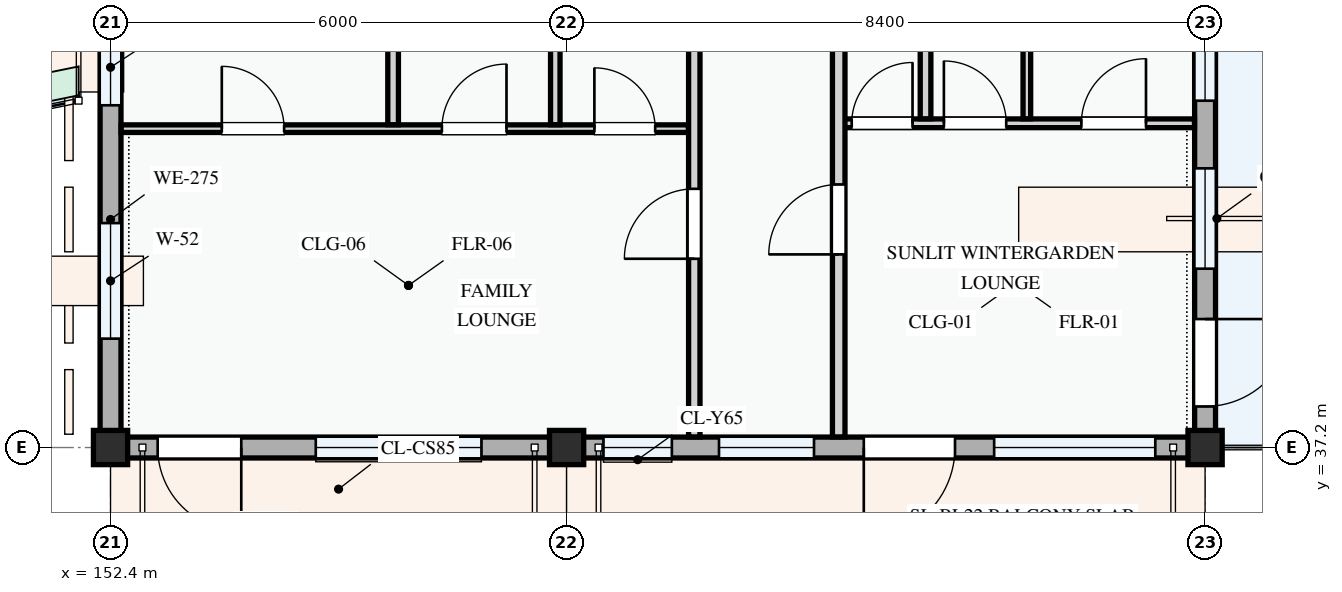
"""IFC4 building model, lengths in metres.
Left out: names, types, materials, properties, quantities, classifications, styles, units other than length and angle.
Written with IfcOpenShell. Run it as: python <this file> out.ifc"""

import sys

from ifc_helpers import new_model, si_unit, direction, frame, frame_2d, origin, origin_2d, place, context, subcontext, project, spatial, rectangle, extrude, element, fill, save


model = new_model("IFC4")
c1 = context("Model", 3, precision=1e-05, world=origin(), true_north=direction((0.0, 1.0)))
c2 = subcontext(c1, "Body", "Model", "MODEL_VIEW")
j1 = project(units=[si_unit("LENGTHUNIT", "METRE"), si_unit("PLANEANGLEUNIT", "RADIAN")], contexts=[c1])
p1 = place(None, origin())
s1 = spatial("IfcSite", under=j1, at=p1, CompositionType="ELEMENT")
p2 = place(p1, origin())
s2 = spatial("IfcBuilding", under=s1, at=p2, CompositionType="ELEMENT")
p3 = place(p2, frame((0.0, 0.0, 21.3)))
s3 = spatial("IfcBuildingStorey", under=s2, at=p3, CompositionType="ELEMENT", Elevation=21.3)
for number, where, z_axis, x_axis in (
    (1, (152.4, 37.2, 0.0), (0.0, 0.0, 1.0), (1.0, 0.0, 0.0)),
    (2, (158.4, 37.2, 0.0), (0.0, 0.0, 1.0), (1.0, 0.0, 0.0)),
    (3, (166.8, 37.2, 0.0), (0.0, 0.0, 1.0), (1.0, 0.0, 0.0)),
):
    element("IfcColumn", number, at=place(p3, frame(where, z_axis=z_axis, x_axis=x_axis)), inside=s3, PredefinedType="COLUMN", context=c2, shape_type="SweptSolid", body=[
        extrude(rectangle(XDim=0.45, YDim=0.45, at=origin_2d()), origin(), (0.0, 0.0, 1.0), 3.3),
    ])
p4 = place(p3, frame((152.4, 43.2, 0.0), z_axis=(0.0, 0.0, 1.0), x_axis=(0.0, -1.0, 0.0)))
e4 = element("IfcWall", 4, at=p4, inside=s3, PredefinedType="STANDARD", context=c2, shape_type="SweptSolid", body=[
    extrude(rectangle(XDim=6.0, YDim=0.275, at=frame_2d((3.0, 0.0))), origin(), (0.0, 0.0, 1.0), 2.575),
])
p5 = place(p4, frame((0.498, 0.0, 0.78)))
e5 = element("IfcOpeningElement", 5, at=p5, cuts=e4, PredefinedType="OPENING", context=c2, shape_type="SweptSolid", body=[
    extrude(rectangle(XDim=1.0, YDim=1.25, at=frame_2d((0.5, 0.625))), frame((0.0, 0.147, 0.0), z_axis=(0.0, -1.0, 0.0), x_axis=(1.0, 0.0, 0.0)), (0.0, 0.0, 1.0), 0.295),
])
p6 = place(p4, frame((3.048, 0.0, 0.78)))
e6 = element("IfcOpeningElement", 6, at=p6, cuts=e4, PredefinedType="OPENING", context=c2, shape_type="SweptSolid", body=[
    extrude(rectangle(XDim=1.52, YDim=1.42, at=frame_2d((0.76, 0.71))), frame((0.0, 0.147, 0.0), z_axis=(0.0, -1.0, 0.0), x_axis=(1.0, 0.0, 0.0)), (0.0, 0.0, 1.0), 0.295),
])
p7 = place(p3, frame((152.4, 37.2, 0.0), z_axis=(0.0, 0.0, 1.0), x_axis=(1.0, 0.0, 0.0)))
e7 = element("IfcWall", 7, at=p7, inside=s3, PredefinedType="STANDARD", context=c2, shape_type="SweptSolid", body=[
    extrude(rectangle(XDim=6.0, YDim=0.275, at=frame_2d((3.0, 0.0))), origin(), (0.0, 0.0, 1.0), 2.475),
])
p8 = place(p7, frame((0.62, 0.0, 0.0)))
e8 = element("IfcOpeningElement", 8, at=p8, cuts=e7, PredefinedType="OPENING", context=c2, shape_type="SweptSolid", body=[
    extrude(rectangle(XDim=1.1, YDim=2.15, at=frame_2d((0.55, 1.075))), frame((0.0, 0.147, 0.0), z_axis=(0.0, -1.0, 0.0), x_axis=(1.0, 0.0, 0.0)), (0.0, 0.0, 1.0), 0.295),
])
p9 = place(p7, frame((2.7, 0.0, 0.78)))
e9 = element("IfcOpeningElement", 9, at=p9, cuts=e7, PredefinedType="OPENING", context=c2, shape_type="SweptSolid", body=[
    extrude(rectangle(XDim=2.18, YDim=1.48, at=frame_2d((1.09, 0.74))), frame((0.0, 0.147, 0.0), z_axis=(0.0, -1.0, 0.0), x_axis=(1.0, 0.0, 0.0)), (0.0, 0.0, 1.0), 0.295),
])
p10 = place(p3, frame((158.4, 37.2, 0.0), z_axis=(0.0, 0.0, 1.0), x_axis=(1.0, 0.0, 0.0)))
e10 = element("IfcWall", 10, at=p10, inside=s3, PredefinedType="STANDARD", context=c2, shape_type="SweptSolid", body=[
    extrude(rectangle(XDim=8.4, YDim=0.275, at=frame_2d((4.2, 0.0))), origin(), (0.0, 0.0, 1.0), 2.375),
])
p11 = place(p10, frame((3.91, 0.0, 0.0)))
e11 = element("IfcOpeningElement", 11, at=p11, cuts=e10, PredefinedType="OPENING", context=c2, shape_type="SweptSolid", body=[
    extrude(rectangle(XDim=1.2, YDim=2.15, at=frame_2d((0.6, 1.075))), frame((0.0, 0.147, 0.0), z_axis=(0.0, -1.0, 0.0), x_axis=(1.0, 0.0, 0.0)), (0.0, 0.0, 1.0), 0.295),
])
p12 = place(p10, frame((0.485, 0.0, 0.78)))
e12 = element("IfcOpeningElement", 12, at=p12, cuts=e10, PredefinedType="OPENING", context=c2, shape_type="SweptSolid", body=[
    extrude(rectangle(XDim=0.9, YDim=1.2, at=frame_2d((0.45, 0.6))), frame((0.0, 0.147, 0.0), z_axis=(0.0, -1.0, 0.0), x_axis=(1.0, 0.0, 0.0)), (0.0, 0.0, 1.0), 0.295),
])
p13 = place(p10, frame((2.005, 0.0, 0.78)))
e13 = element("IfcOpeningElement", 13, at=p13, cuts=e10, PredefinedType="OPENING", context=c2, shape_type="SweptSolid", body=[
    extrude(rectangle(XDim=1.25, YDim=1.3, at=frame_2d((0.625, 0.65))), frame((0.0, 0.147, 0.0), z_axis=(0.0, -1.0, 0.0), x_axis=(1.0, 0.0, 0.0)), (0.0, 0.0, 1.0), 0.295),
])
p14 = place(p10, frame((5.625, 0.0, 0.78)))
e14 = element("IfcOpeningElement", 14, at=p14, cuts=e10, PredefinedType="OPENING", context=c2, shape_type="SweptSolid", body=[
    extrude(rectangle(XDim=2.12, YDim=1.44, at=frame_2d((1.06, 0.72))), frame((0.0, 0.147, 0.0), z_axis=(0.0, -1.0, 0.0), x_axis=(1.0, 0.0, 0.0)), (0.0, 0.0, 1.0), 0.295),
])
p15 = place(p3, frame((166.8, 37.2, 0.0), z_axis=(0.0, 0.0, 1.0), x_axis=(0.0, 1.0, 0.0)))
e15 = element("IfcWall", 15, at=p15, inside=s3, PredefinedType="STANDARD", context=c2, shape_type="SweptSolid", body=[
    extrude(rectangle(XDim=6.0, YDim=0.275, at=frame_2d((3.0, 0.0))), origin(), (0.0, 0.0, 1.0), 2.445),
])
p16 = place(p15, frame((0.54, 0.0, 0.0)))
e16 = element("IfcOpeningElement", 16, at=p16, cuts=e15, PredefinedType="OPENING", context=c2, shape_type="SweptSolid", body=[
    extrude(rectangle(XDim=1.15, YDim=2.15, at=frame_2d((0.575, 1.075))), frame((0.0, 0.147, 0.0), z_axis=(0.0, -1.0, 0.0), x_axis=(1.0, 0.0, 0.0)), (0.0, 0.0, 1.0), 0.295),
])
p17 = place(p15, frame((2.353, 0.0, 0.78)))
e17 = element("IfcOpeningElement", 17, at=p17, cuts=e15, PredefinedType="OPENING", context=c2, shape_type="SweptSolid", body=[
    extrude(rectangle(XDim=1.32, YDim=1.35, at=frame_2d((0.66, 0.675))), frame((0.0, 0.147, 0.0), z_axis=(0.0, -1.0, 0.0), x_axis=(1.0, 0.0, 0.0)), (0.0, 0.0, 1.0), 0.295),
])
p18 = place(p15, frame((4.563, 0.0, 0.78)))
e18 = element("IfcOpeningElement", 18, at=p18, cuts=e15, PredefinedType="OPENING", context=c2, shape_type="SweptSolid", body=[
    extrude(rectangle(XDim=0.95, YDim=1.15, at=frame_2d((0.475, 0.575))), frame((0.0, 0.147, 0.0), z_axis=(0.0, -1.0, 0.0), x_axis=(1.0, 0.0, 0.0)), (0.0, 0.0, 1.0), 0.295),
])
p19 = place(p3, frame((152.54, 41.395, 0.0), z_axis=(0.0, 0.0, 1.0), x_axis=(1.0, 0.0, 0.0)))
e19 = element("IfcWall", 19, at=p19, inside=s3, PredefinedType="PARTITIONING", context=c2, shape_type="SweptSolid", body=[
    extrude(rectangle(XDim=7.463, YDim=0.1, at=frame_2d((3.732, 0.0))), origin(), (0.0, 0.0, 1.0), 3.0),
])
p20 = place(p19, frame((1.324, 0.0, 0.0)))
e20 = element("IfcOpeningElement", 20, at=p20, cuts=e19, PredefinedType="OPENING", context=c2, shape_type="SweptSolid", body=[
    extrude(rectangle(XDim=0.82, YDim=2.08, at=frame_2d((0.41, 1.04))), frame((0.0, 0.06, 0.0), z_axis=(0.0, -1.0, 0.0), x_axis=(1.0, 0.0, 0.0)), (0.0, 0.0, 1.0), 0.12),
])
p21 = place(p19, frame((4.22, 0.0, 0.0)))
e21 = element("IfcOpeningElement", 21, at=p21, cuts=e19, PredefinedType="OPENING", context=c2, shape_type="SweptSolid", body=[
    extrude(rectangle(XDim=0.85, YDim=2.1, at=frame_2d((0.425, 1.05))), frame((0.0, 0.06, 0.0), z_axis=(0.0, -1.0, 0.0), x_axis=(1.0, 0.0, 0.0)), (0.0, 0.0, 1.0), 0.12),
])
p22 = place(p19, frame((6.226, 0.0, 0.0)))
e22 = element("IfcOpeningElement", 22, at=p22, cuts=e19, PredefinedType="OPENING", context=c2, shape_type="SweptSolid", body=[
    extrude(rectangle(XDim=0.8, YDim=2.1, at=frame_2d((0.4, 1.05))), frame((0.0, 0.06, 0.0), z_axis=(0.0, -1.0, 0.0), x_axis=(1.0, 0.0, 0.0)), (0.0, 0.0, 1.0), 0.12),
])
p23 = place(p3, frame((156.118, 41.447, 0.0), z_axis=(0.0, 0.0, 1.0), x_axis=(0.0, 1.0, 0.0)))
e23 = element("IfcWall", 23, at=p23, inside=s3, PredefinedType="PARTITIONING", context=c2, shape_type="SweptSolid", body=[
    extrude(rectangle(XDim=7.181, YDim=0.14, at=frame_2d((3.59, 0.0))), origin(), (0.0, 0.0, 1.0), 3.0),
])
p24 = place(p3, frame((158.251, 41.447, 0.0), z_axis=(0.0, 0.0, 1.0), x_axis=(0.0, 1.0, 0.0)))
e24 = element("IfcWall", 24, at=p24, inside=s3, PredefinedType="PARTITIONING", context=c2, shape_type="SweptSolid", body=[
    extrude(rectangle(XDim=7.181, YDim=0.125, at=frame_2d((3.59, 0.0))), origin(), (0.0, 0.0, 1.0), 2.425),
])
p25 = place(p3, frame((161.98, 41.466, 0.0), z_axis=(0.0, 0.0, 1.0), x_axis=(1.0, 0.0, 0.0)))
e25 = element("IfcWall", 25, at=p25, inside=s3, PredefinedType="PARTITIONING", context=c2, shape_type="SweptSolid", body=[
    extrude(rectangle(XDim=4.68, YDim=0.115, at=frame_2d((2.34, 0.0))), origin(), (0.0, 0.0, 1.0), 3.0),
])
p26 = place(p25, frame((0.171, 0.0, 0.0)))
e26 = element("IfcOpeningElement", 26, at=p26, cuts=e25, PredefinedType="OPENING", context=c2, shape_type="SweptSolid", body=[
    extrude(rectangle(XDim=0.8, YDim=2.1, at=frame_2d((0.4, 1.05))), frame((0.0, 0.067, 0.0), z_axis=(0.0, -1.0, 0.0), x_axis=(1.0, 0.0, 0.0)), (0.0, 0.0, 1.0), 0.135),
])
p27 = place(p25, frame((1.384, 0.0, 0.0)))
e27 = element("IfcOpeningElement", 27, at=p27, cuts=e25, PredefinedType="OPENING", context=c2, shape_type="SweptSolid", body=[
    extrude(rectangle(XDim=0.82, YDim=2.08, at=frame_2d((0.41, 1.04))), frame((0.0, 0.067, 0.0), z_axis=(0.0, -1.0, 0.0), x_axis=(1.0, 0.0, 0.0)), (0.0, 0.0, 1.0), 0.135),
])
p28 = place(p25, frame((3.193, 0.0, 0.0)))
e28 = element("IfcOpeningElement", 28, at=p28, cuts=e25, PredefinedType="OPENING", context=c2, shape_type="SweptSolid", body=[
    extrude(rectangle(XDim=0.85, YDim=2.1, at=frame_2d((0.425, 1.05))), frame((0.0, 0.067, 0.0), z_axis=(0.0, -1.0, 0.0), x_axis=(1.0, 0.0, 0.0)), (0.0, 0.0, 1.0), 0.135),
])
p29 = place(p3, frame((164.455, 41.525, 0.0), z_axis=(0.0, 0.0, 1.0), x_axis=(0.0, 1.0, 0.0)))
e29 = element("IfcWall", 29, at=p29, inside=s3, PredefinedType="PARTITIONING", context=c2, shape_type="SweptSolid", body=[
    extrude(rectangle(XDim=7.093, YDim=0.1, at=frame_2d((3.546, 0.0))), origin(), (0.0, 0.0, 1.0), 3.0),
])
p30 = place(p3, frame((163.122, 41.525, 0.0), z_axis=(0.0, 0.0, 1.0), x_axis=(0.0, 1.0, 0.0)))
e30 = element("IfcWall", 30, at=p30, inside=s3, PredefinedType="PARTITIONING", context=c2, shape_type="SweptSolid", body=[
    extrude(rectangle(XDim=7.093, YDim=0.14, at=frame_2d((3.546, 0.0))), origin(), (0.0, 0.0, 1.0), 3.0),
])
p31 = place(p3, frame((160.08, 37.34, 0.0), z_axis=(0.0, 0.0, 1.0), x_axis=(0.0, 1.0, 0.0)))
e31 = element("IfcWall", 31, at=p31, inside=s3, PredefinedType="PARTITIONING", context=c2, shape_type="SweptSolid", body=[
    extrude(rectangle(XDim=20.4, YDim=0.15, at=frame_2d((10.2, 0.0))), origin(), (0.0, 0.0, 1.0), 3.0),
])
p32 = place(p31, frame((2.344, 0.0, 0.0)))
e32 = element("IfcOpeningElement", 32, at=p32, cuts=e31, PredefinedType="OPENING", context=c2, shape_type="SweptSolid", body=[
    extrude(rectangle(XDim=0.92, YDim=2.1, at=frame_2d((0.46, 1.05))), frame((0.0, 0.085, 0.0), z_axis=(0.0, -1.0, 0.0), x_axis=(1.0, 0.0, 0.0)), (0.0, 0.0, 1.0), 0.17),
])
p33 = place(p31, frame((11.64, 0.0, 0.0)))
e33 = element("IfcOpeningElement", 33, at=p33, cuts=e31, PredefinedType="OPENING", context=c2, shape_type="SweptSolid", body=[
    extrude(rectangle(XDim=0.92, YDim=2.1, at=frame_2d((0.46, 1.05))), frame((0.0, 0.085, 0.0), z_axis=(0.0, -1.0, 0.0), x_axis=(1.0, 0.0, 0.0)), (0.0, 0.0, 1.0), 0.17),
])
p34 = place(p3, frame((161.98, 37.34, 0.0), z_axis=(0.0, 0.0, 1.0), x_axis=(0.0, 1.0, 0.0)))
e34 = element("IfcWall", 34, at=p34, inside=s3, PredefinedType="PARTITIONING", context=c2, shape_type="SweptSolid", body=[
    extrude(rectangle(XDim=20.4, YDim=0.165, at=frame_2d((10.2, 0.0))), origin(), (0.0, 0.0, 1.0), 3.0),
])
p35 = place(p34, frame((2.401, 0.0, 0.0)))
e35 = element("IfcOpeningElement", 35, at=p35, cuts=e34, PredefinedType="OPENING", context=c2, shape_type="SweptSolid", body=[
    extrude(rectangle(XDim=0.92, YDim=2.1, at=frame_2d((0.46, 1.05))), frame((0.0, 0.093, 0.0), z_axis=(0.0, -1.0, 0.0), x_axis=(1.0, 0.0, 0.0)), (0.0, 0.0, 1.0), 0.185),
])
p36 = place(p34, frame((11.64, 0.0, 0.0)))
e36 = element("IfcOpeningElement", 36, at=p36, cuts=e34, PredefinedType="OPENING", context=c2, shape_type="SweptSolid", body=[
    extrude(rectangle(XDim=0.96, YDim=2.12, at=frame_2d((0.48, 1.06))), frame((0.0, 0.093, 0.0), z_axis=(0.0, -1.0, 0.0), x_axis=(1.0, 0.0, 0.0)), (0.0, 0.0, 1.0), 0.185),
])
p37 = place(p5, origin())
e37 = element("IfcWindow", 37, at=p37, inside=s3, PartitioningType="SINGLE_PANEL", PredefinedType="WINDOW", context=c2, shape_type="SweptSolid", body=[
    extrude(rectangle(XDim=1.0, YDim=1.25, at=frame_2d((0.5, 0.625))), frame((0.0, 0.03, 0.0), z_axis=(0.0, -1.0, 0.0), x_axis=(1.0, 0.0, 0.0)), (0.0, 0.0, 1.0), 0.06),
])
fill(e5, e37)
p38 = place(p6, origin())
e38 = element("IfcWindow", 38, at=p38, inside=s3, PartitioningType="SINGLE_PANEL", PredefinedType="WINDOW", context=c2, shape_type="SweptSolid", body=[
    extrude(rectangle(XDim=1.52, YDim=1.42, at=frame_2d((0.76, 0.71))), frame((0.0, 0.03, 0.0), z_axis=(0.0, -1.0, 0.0), x_axis=(1.0, 0.0, 0.0)), (0.0, 0.0, 1.0), 0.06),
])
fill(e6, e38)
p39 = place(p8, frame((1.1, 0.0, 0.0), z_axis=(0.0, 0.0, 1.0), x_axis=(-1.0, 0.0, 0.0)))
e39 = element("IfcDoor", 39, at=p39, inside=s3, OperationType="SINGLE_SWING_LEFT", PredefinedType="DOOR", context=c2, shape_type="SweptSolid", body=[
    extrude(rectangle(XDim=1.1, YDim=2.15, at=frame_2d((0.55, 1.075))), frame((0.0, 0.025, 0.0), z_axis=(0.0, -1.0, 0.0), x_axis=(1.0, 0.0, 0.0)), (0.0, 0.0, 1.0), 0.05),
])
fill(e8, e39)
p40 = place(p9, origin())
e40 = element("IfcWindow", 40, at=p40, inside=s3, PartitioningType="DOUBLE_PANEL_VERTICAL", PredefinedType="WINDOW", context=c2, shape_type="SweptSolid", body=[
    extrude(rectangle(XDim=2.18, YDim=1.48, at=frame_2d((1.09, 0.74))), frame((0.0, 0.03, 0.0), z_axis=(0.0, -1.0, 0.0), x_axis=(1.0, 0.0, 0.0)), (0.0, 0.0, 1.0), 0.06),
])
fill(e9, e40)
p41 = place(p11, frame((1.2, 0.0, 0.0), z_axis=(0.0, 0.0, 1.0), x_axis=(-1.0, 0.0, 0.0)))
e41 = element("IfcDoor", 41, at=p41, inside=s3, OperationType="SINGLE_SWING_RIGHT", PredefinedType="DOOR", context=c2, shape_type="SweptSolid", body=[
    extrude(rectangle(XDim=1.2, YDim=2.15, at=frame_2d((0.6, 1.075))), frame((0.0, 0.025, 0.0), z_axis=(0.0, -1.0, 0.0), x_axis=(1.0, 0.0, 0.0)), (0.0, 0.0, 1.0), 0.05),
])
fill(e11, e41)
p42 = place(p12, origin())
e42 = element("IfcWindow", 42, at=p42, inside=s3, PartitioningType="SINGLE_PANEL", PredefinedType="WINDOW", context=c2, shape_type="SweptSolid", body=[
    extrude(rectangle(XDim=0.9, YDim=1.2, at=frame_2d((0.45, 0.6))), frame((0.0, 0.03, 0.0), z_axis=(0.0, -1.0, 0.0), x_axis=(1.0, 0.0, 0.0)), (0.0, 0.0, 1.0), 0.06),
])
fill(e12, e42)
p43 = place(p13, origin())
e43 = element("IfcWindow", 43, at=p43, inside=s3, PartitioningType="SINGLE_PANEL", PredefinedType="WINDOW", context=c2, shape_type="SweptSolid", body=[
    extrude(rectangle(XDim=1.25, YDim=1.3, at=frame_2d((0.625, 0.65))), frame((0.0, 0.03, 0.0), z_axis=(0.0, -1.0, 0.0), x_axis=(1.0, 0.0, 0.0)), (0.0, 0.0, 1.0), 0.06),
])
fill(e13, e43)
p44 = place(p14, origin())
e44 = element("IfcWindow", 44, at=p44, inside=s3, PartitioningType="DOUBLE_PANEL_VERTICAL", PredefinedType="WINDOW", context=c2, shape_type="SweptSolid", body=[
    extrude(rectangle(XDim=2.12, YDim=1.44, at=frame_2d((1.06, 0.72))), frame((0.0, 0.03, 0.0), z_axis=(0.0, -1.0, 0.0), x_axis=(1.0, 0.0, 0.0)), (0.0, 0.0, 1.0), 0.06),
])
fill(e14, e44)
p45 = place(p16, frame((1.15, 0.0, 0.0), z_axis=(0.0, 0.0, 1.0), x_axis=(-1.0, 0.0, 0.0)))
e45 = element("IfcDoor", 45, at=p45, inside=s3, OperationType="SINGLE_SWING_LEFT", PredefinedType="DOOR", context=c2, shape_type="SweptSolid", body=[
    extrude(rectangle(XDim=1.15, YDim=2.15, at=frame_2d((0.575, 1.075))), frame((0.0, 0.025, 0.0), z_axis=(0.0, -1.0, 0.0), x_axis=(1.0, 0.0, 0.0)), (0.0, 0.0, 1.0), 0.05),
])
fill(e16, e45)
p46 = place(p17, origin())
e46 = element("IfcWindow", 46, at=p46, inside=s3, PartitioningType="SINGLE_PANEL", PredefinedType="WINDOW", context=c2, shape_type="SweptSolid", body=[
    extrude(rectangle(XDim=1.32, YDim=1.35, at=frame_2d((0.66, 0.675))), frame((0.0, 0.03, 0.0), z_axis=(0.0, -1.0, 0.0), x_axis=(1.0, 0.0, 0.0)), (0.0, 0.0, 1.0), 0.06),
])
fill(e17, e46)
p47 = place(p18, origin())
e47 = element("IfcWindow", 47, at=p47, inside=s3, PartitioningType="SINGLE_PANEL", PredefinedType="WINDOW", context=c2, shape_type="SweptSolid", body=[
    extrude(rectangle(XDim=0.95, YDim=1.15, at=frame_2d((0.475, 0.575))), frame((0.0, 0.03, 0.0), z_axis=(0.0, -1.0, 0.0), x_axis=(1.0, 0.0, 0.0)), (0.0, 0.0, 1.0), 0.06),
])
fill(e18, e47)
p48 = place(p20, origin())
e48 = element("IfcDoor", 48, at=p48, inside=s3, OperationType="SINGLE_SWING_LEFT", PredefinedType="DOOR", context=c2, shape_type="SweptSolid", body=[
    extrude(rectangle(XDim=0.82, YDim=2.08, at=frame_2d((0.41, 1.04))), frame((0.0, 0.025, 0.0), z_axis=(0.0, -1.0, 0.0), x_axis=(1.0, 0.0, 0.0)), (0.0, 0.0, 1.0), 0.05),
])
fill(e20, e48)
p49 = place(p21, origin())
e49 = element("IfcDoor", 49, at=p49, inside=s3, OperationType="SINGLE_SWING_RIGHT", PredefinedType="DOOR", context=c2, shape_type="SweptSolid", body=[
    extrude(rectangle(XDim=0.85, YDim=2.1, at=frame_2d((0.425, 1.05))), frame((0.0, 0.025, 0.0), z_axis=(0.0, -1.0, 0.0), x_axis=(1.0, 0.0, 0.0)), (0.0, 0.0, 1.0), 0.05),
])
fill(e21, e49)
p50 = place(p22, origin())
e50 = element("IfcDoor", 50, at=p50, inside=s3, OperationType="SINGLE_SWING_LEFT", PredefinedType="DOOR", context=c2, shape_type="SweptSolid", body=[
    extrude(rectangle(XDim=0.8, YDim=2.1, at=frame_2d((0.4, 1.05))), frame((0.0, 0.025, 0.0), z_axis=(0.0, -1.0, 0.0), x_axis=(1.0, 0.0, 0.0)), (0.0, 0.0, 1.0), 0.05),
])
fill(e22, e50)
p51 = place(p26, origin())
e51 = element("IfcDoor", 51, at=p51, inside=s3, OperationType="SINGLE_SWING_RIGHT", PredefinedType="DOOR", context=c2, shape_type="SweptSolid", body=[
    extrude(rectangle(XDim=0.8, YDim=2.1, at=frame_2d((0.4, 1.05))), frame((0.0, 0.025, 0.0), z_axis=(0.0, -1.0, 0.0), x_axis=(1.0, 0.0, 0.0)), (0.0, 0.0, 1.0), 0.05),
])
fill(e26, e51)
p52 = place(p27, origin())
e52 = element("IfcDoor", 52, at=p52, inside=s3, OperationType="SINGLE_SWING_LEFT", PredefinedType="DOOR", context=c2, shape_type="SweptSolid", body=[
    extrude(rectangle(XDim=0.82, YDim=2.08, at=frame_2d((0.41, 1.04))), frame((0.0, 0.025, 0.0), z_axis=(0.0, -1.0, 0.0), x_axis=(1.0, 0.0, 0.0)), (0.0, 0.0, 1.0), 0.05),
])
fill(e27, e52)
p53 = place(p28, origin())
e53 = element("IfcDoor", 53, at=p53, inside=s3, OperationType="SINGLE_SWING_RIGHT", PredefinedType="DOOR", context=c2, shape_type="SweptSolid", body=[
    extrude(rectangle(XDim=0.85, YDim=2.1, at=frame_2d((0.425, 1.05))), frame((0.0, 0.025, 0.0), z_axis=(0.0, -1.0, 0.0), x_axis=(1.0, 0.0, 0.0)), (0.0, 0.0, 1.0), 0.05),
])
fill(e28, e53)
p54 = place(p32, origin())
e54 = element("IfcDoor", 54, at=p54, inside=s3, OperationType="SINGLE_SWING_LEFT", PredefinedType="DOOR", context=c2, shape_type="SweptSolid", body=[
    extrude(rectangle(XDim=0.92, YDim=2.1, at=frame_2d((0.46, 1.05))), frame((0.0, 0.025, 0.0), z_axis=(0.0, -1.0, 0.0), x_axis=(1.0, 0.0, 0.0)), (0.0, 0.0, 1.0), 0.05),
])
fill(e32, e54)
p55 = place(p35, origin())
e55 = element("IfcDoor", 55, at=p55, inside=s3, OperationType="SINGLE_SWING_LEFT", PredefinedType="DOOR", context=c2, shape_type="SweptSolid", body=[
    extrude(rectangle(XDim=0.92, YDim=2.1, at=frame_2d((0.46, 1.05))), frame((0.0, 0.025, 0.0), z_axis=(0.0, -1.0, 0.0), x_axis=(1.0, 0.0, 0.0)), (0.0, 0.0, 1.0), 0.05),
])
fill(e35, e55)
save(model, sys.argv[1])
